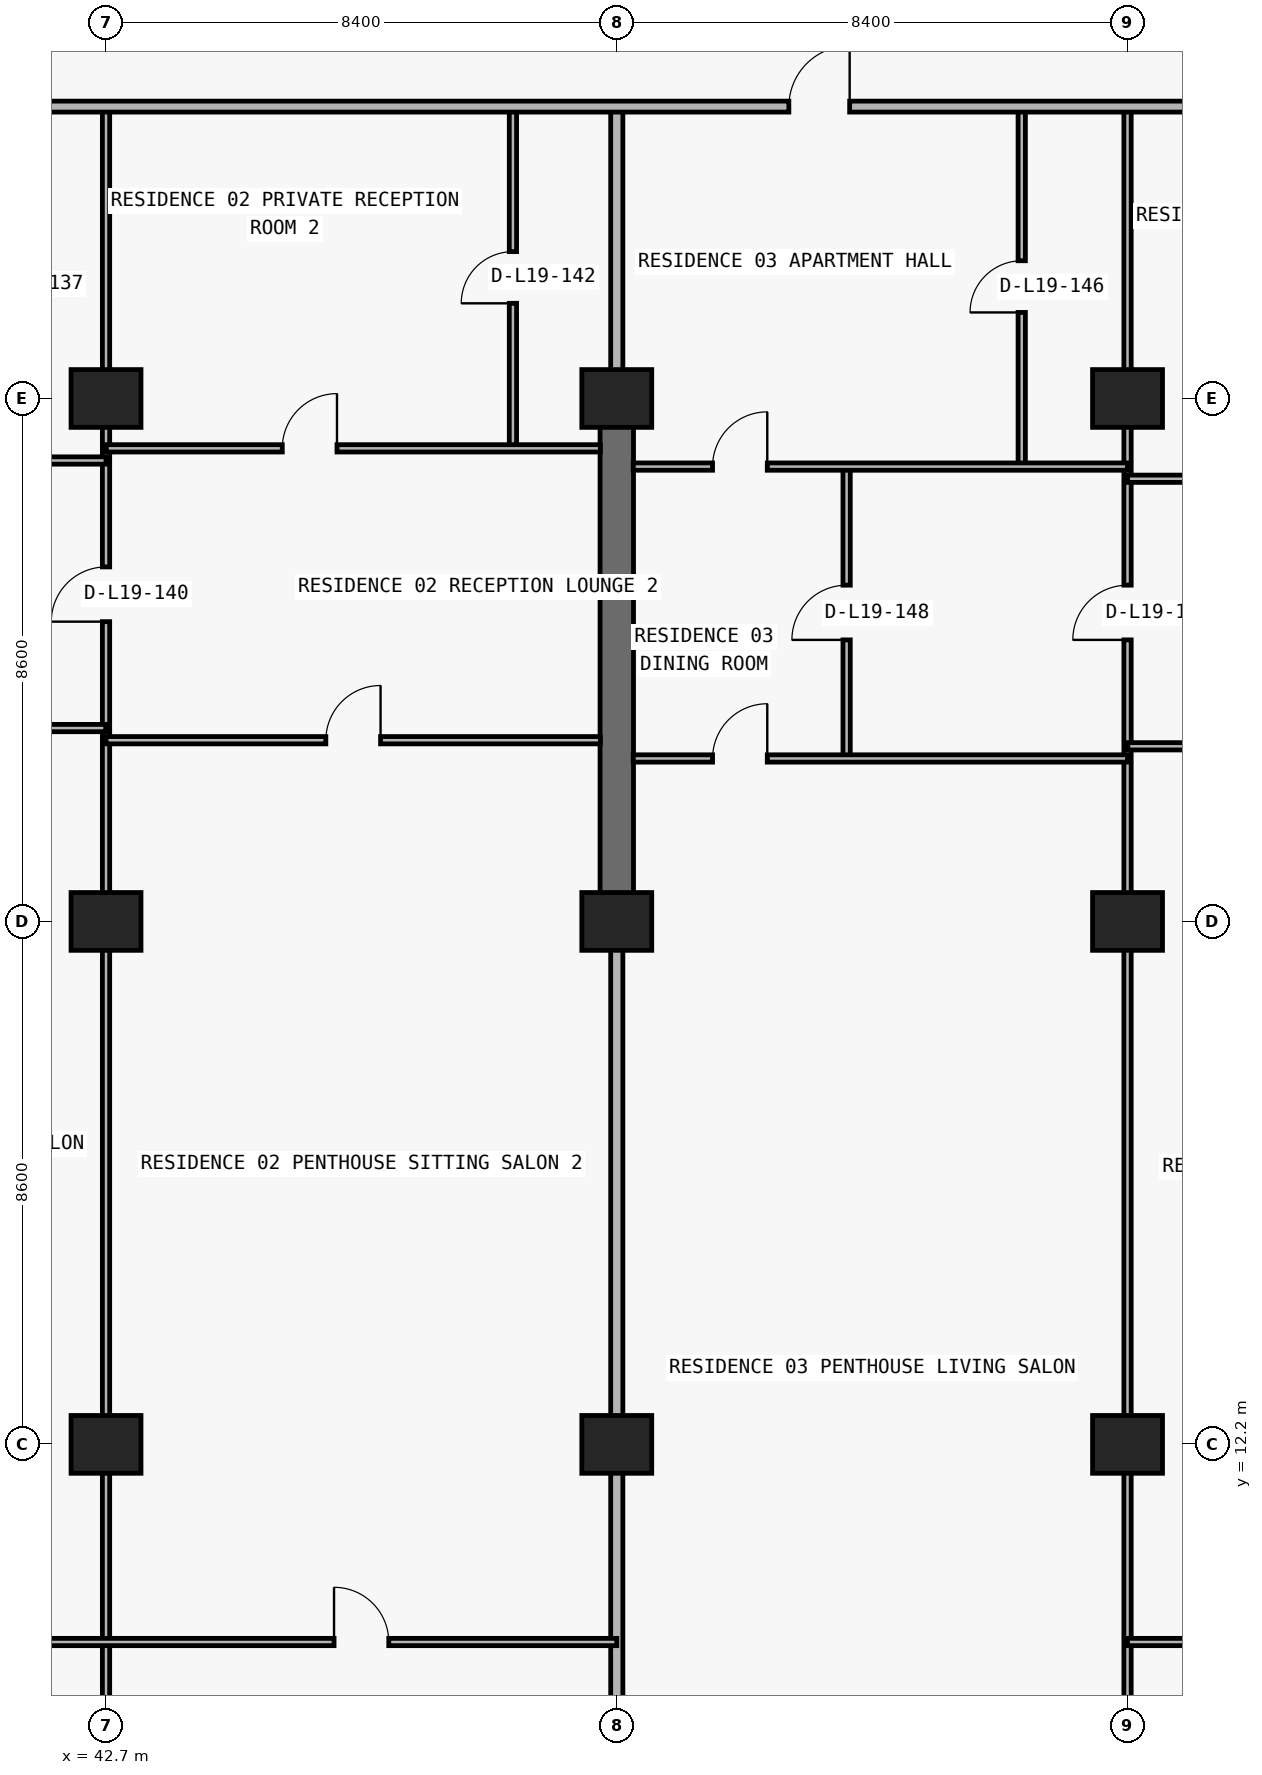
"""IFC4 building model, lengths in metres.
Left out: names, types, materials, properties, quantities, classifications, styles, units other than length and angle.
Written with IfcOpenShell. Run it as: python <this file> out.ifc"""

import sys

from ifc_helpers import new_model, si_unit, direction, frame, frame_2d, origin, origin_2d, place, context, subcontext, project, spatial, rectangle, extrude, element, fill, save


model = new_model("IFC4")
c1 = context("Model", 3, precision=1e-05, world=origin(), true_north=direction((0.0, 1.0)))
c2 = subcontext(c1, "Body", "Model", "MODEL_VIEW")
j1 = project(units=[si_unit("LENGTHUNIT", "METRE"), si_unit("PLANEANGLEUNIT", "RADIAN")], contexts=[c1])
p1 = place(None, origin())
s1 = spatial("IfcSite", under=j1, at=p1, CompositionType="ELEMENT")
p2 = place(p1, origin())
s2 = spatial("IfcBuilding", under=s1, at=p2, CompositionType="ELEMENT")
p3 = place(p2, frame((0.0, 0.0, 72.9)))
s3 = spatial("IfcBuildingStorey", under=s2, at=p3, CompositionType="ELEMENT", Elevation=72.9)
for number, where, z_axis, x_axis in (
    (1, (42.7, 12.2, 0.0), (0.0, 0.0, 1.0), (1.0, 0.0, 0.0)),
    (2, (51.1, 12.2, 0.0), (0.0, 0.0, 1.0), (1.0, 0.0, 0.0)),
    (3, (59.5, 12.2, 0.0), (0.0, 0.0, 1.0), (1.0, 0.0, 0.0)),
    (4, (42.7, 20.8, 0.0), (0.0, 0.0, 1.0), (1.0, 0.0, 0.0)),
    (5, (51.1, 20.8, 0.0), (0.0, 0.0, 1.0), (1.0, 0.0, 0.0)),
    (6, (59.5, 20.8, 0.0), (0.0, 0.0, 1.0), (1.0, 0.0, 0.0)),
    (7, (42.7, 29.4, 0.0), (0.0, 0.0, 1.0), (1.0, 0.0, 0.0)),
    (8, (51.1, 29.4, 0.0), (0.0, 0.0, 1.0), (1.0, 0.0, 0.0)),
    (9, (59.5, 29.4, 0.0), (0.0, 0.0, 1.0), (1.0, 0.0, 0.0)),
):
    element("IfcColumn", number, at=place(p3, frame(where, z_axis=z_axis, x_axis=x_axis)), inside=s3, PredefinedType="COLUMN", context=c2, shape_type="SweptSolid", body=[
        extrude(rectangle(XDim=1.15, YDim=0.95, at=origin_2d()), origin(), (0.0, 0.0, 1.0), 3.05),
    ])
p4 = place(p3, frame((51.1, 20.8, 0.0), z_axis=(0.0, 0.0, 1.0), x_axis=(0.0, 1.0, 0.0)))
e10 = element("IfcWall", 10, at=p4, inside=s3, PredefinedType="SHEAR", context=c2, shape_type="SweptSolid", body=[
    extrude(rectangle(XDim=8.6, YDim=0.55, at=frame_2d((4.3, 0.0))), origin(), (0.0, 0.0, 1.0), 3.05),
])
p5 = place(p3, frame((42.7, 6.24, 0.0), z_axis=(0.0, 0.0, 1.0), x_axis=(0.0, 1.0, 0.0)))
e11 = element("IfcWall", 11, at=p5, inside=s3, PredefinedType="PARTITIONING", context=c2, shape_type="SweptSolid", body=[
    extrude(rectangle(XDim=27.96, YDim=0.12, at=frame_2d((13.98, 0.0))), origin(), (0.0, 0.0, 1.0), 2.11),
])
p6 = place(p5, frame((19.49, 0.0, 0.0)))
e12 = element("IfcOpeningElement", 12, at=p6, cuts=e11, PredefinedType="OPENING", context=c2, shape_type="SweptSolid", body=[
    extrude(rectangle(XDim=0.9, YDim=2.06, at=frame_2d((0.45, 1.03))), frame((0.0, 0.07, 0.0), z_axis=(0.0, -1.0, 0.0), x_axis=(1.0, 0.0, 0.0)), (0.0, 0.0, 1.0), 0.14),
])
p7 = place(p3, frame((49.392, 28.58, 0.0), z_axis=(0.0, 0.0, 1.0), x_axis=(0.0, 1.0, 0.0)))
e13 = element("IfcWall", 13, at=p7, inside=s3, PredefinedType="PARTITIONING", context=c2, shape_type="SweptSolid", body=[
    extrude(rectangle(XDim=5.62, YDim=0.12, at=frame_2d((2.81, 0.0))), origin(), (0.0, 0.0, 1.0), 3.05),
])
p8 = place(p7, frame((2.385, 0.0, 0.0)))
e14 = element("IfcOpeningElement", 14, at=p8, cuts=e13, PredefinedType="OPENING", context=c2, shape_type="SweptSolid", body=[
    extrude(rectangle(XDim=0.85, YDim=2.1, at=frame_2d((0.425, 1.05))), frame((0.0, 0.07, 0.0), z_axis=(0.0, -1.0, 0.0), x_axis=(1.0, 0.0, 0.0)), (0.0, 0.0, 1.0), 0.14),
])
p9 = place(p3, frame((51.1, 6.24, 0.0), z_axis=(0.0, 0.0, 1.0), x_axis=(0.0, 1.0, 0.0)))
e15 = element("IfcWall", 15, at=p9, inside=s3, PredefinedType="PARTITIONING", context=c2, shape_type="SweptSolid", body=[
    extrude(rectangle(XDim=14.555, YDim=0.2, at=frame_2d((7.277, 0.0))), origin(), (0.0, 0.0, 1.0), 2.11),
])
p10 = place(p3, frame((51.1, 29.405, 0.0), z_axis=(0.0, 0.0, 1.0), x_axis=(0.0, 1.0, 0.0)))
e16 = element("IfcWall", 16, at=p10, inside=s3, PredefinedType="PARTITIONING", context=c2, shape_type="SweptSolid", body=[
    extrude(rectangle(XDim=4.795, YDim=0.2, at=frame_2d((2.397, 0.0))), origin(), (0.0, 0.0, 1.0), 2.335),
])
p11 = place(p3, frame((54.88, 23.48, 0.0), z_axis=(0.0, 0.0, 1.0), x_axis=(0.0, 1.0, 0.0)))
e17 = element("IfcWall", 17, at=p11, inside=s3, PredefinedType="PARTITIONING", context=c2, shape_type="SweptSolid", body=[
    extrude(rectangle(XDim=4.8, YDim=0.12, at=frame_2d((2.4, 0.0))), origin(), (0.0, 0.0, 1.0), 3.05),
])
p12 = place(p11, frame((1.95, 0.0, 0.0)))
e18 = element("IfcOpeningElement", 18, at=p12, cuts=e17, PredefinedType="OPENING", context=c2, shape_type="SweptSolid", body=[
    extrude(rectangle(XDim=0.9, YDim=2.15, at=frame_2d((0.45, 1.075))), frame((0.0, 0.07, 0.0), z_axis=(0.0, -1.0, 0.0), x_axis=(1.0, 0.0, 0.0)), (0.0, 0.0, 1.0), 0.14),
])
p13 = place(p3, frame((57.76, 28.28, 0.0), z_axis=(0.0, 0.0, 1.0), x_axis=(0.0, 1.0, 0.0)))
e19 = element("IfcWall", 19, at=p13, inside=s3, PredefinedType="PARTITIONING", context=c2, shape_type="SweptSolid", body=[
    extrude(rectangle(XDim=5.92, YDim=0.12, at=frame_2d((2.96, 0.0))), origin(), (0.0, 0.0, 1.0), 3.05),
])
p14 = place(p13, frame((2.535, 0.0, 0.0)))
e20 = element("IfcOpeningElement", 20, at=p14, cuts=e19, PredefinedType="OPENING", context=c2, shape_type="SweptSolid", body=[
    extrude(rectangle(XDim=0.85, YDim=2.1, at=frame_2d((0.425, 1.05))), frame((0.0, 0.07, 0.0), z_axis=(0.0, -1.0, 0.0), x_axis=(1.0, 0.0, 0.0)), (0.0, 0.0, 1.0), 0.14),
])
p15 = place(p3, frame((59.5, 6.24, 0.0), z_axis=(0.0, 0.0, 1.0), x_axis=(0.0, 1.0, 0.0)))
e21 = element("IfcWall", 21, at=p15, inside=s3, PredefinedType="PARTITIONING", context=c2, shape_type="SweptSolid", body=[
    extrude(rectangle(XDim=27.96, YDim=0.12, at=frame_2d((13.98, 0.0))), origin(), (0.0, 0.0, 1.0), 2.11),
])
p16 = place(p15, frame((19.19, 0.0, 0.0)))
e22 = element("IfcOpeningElement", 22, at=p16, cuts=e21, PredefinedType="OPENING", context=c2, shape_type="SweptSolid", body=[
    extrude(rectangle(XDim=0.9, YDim=2.06, at=frame_2d((0.45, 1.03))), frame((0.0, 0.07, 0.0), z_axis=(0.0, -1.0, 0.0), x_axis=(1.0, 0.0, 0.0)), (0.0, 0.0, 1.0), 0.14),
])
p17 = place(p3, frame((35.1, 8.95, 0.0), z_axis=(0.0, 0.0, 1.0), x_axis=(1.0, 0.0, 0.0)))
e23 = element("IfcWall", 23, at=p17, inside=s3, PredefinedType="PARTITIONING", context=c2, shape_type="SweptSolid", body=[
    extrude(rectangle(XDim=16.0, YDim=0.12, at=frame_2d((8.0, 0.0))), origin(), (0.0, 0.0, 1.0), 3.05),
])
p18 = place(p17, frame((3.35, 0.0, 0.0)))
e24 = element("IfcOpeningElement", 24, at=p18, cuts=e23, PredefinedType="OPENING", context=c2, shape_type="SweptSolid", body=[
    extrude(rectangle(XDim=0.9, YDim=2.15, at=frame_2d((0.45, 1.075))), frame((0.0, 0.07, 0.0), z_axis=(0.0, -1.0, 0.0), x_axis=(1.0, 0.0, 0.0)), (0.0, 0.0, 1.0), 0.14),
])
p19 = place(p17, frame((11.35, 0.0, 0.0)))
e25 = element("IfcOpeningElement", 25, at=p19, cuts=e23, PredefinedType="OPENING", context=c2, shape_type="SweptSolid", body=[
    extrude(rectangle(XDim=0.9, YDim=2.15, at=frame_2d((0.45, 1.075))), frame((0.0, 0.07, 0.0), z_axis=(0.0, -1.0, 0.0), x_axis=(1.0, 0.0, 0.0)), (0.0, 0.0, 1.0), 0.14),
])
p20 = place(p3, frame((59.5, 8.95, 0.0), z_axis=(0.0, 0.0, 1.0), x_axis=(1.0, 0.0, 0.0)))
e26 = element("IfcWall", 26, at=p20, inside=s3, PredefinedType="PARTITIONING", context=c2, shape_type="SweptSolid", body=[
    extrude(rectangle(XDim=8.4, YDim=0.12, at=frame_2d((4.2, 0.0))), origin(), (0.0, 0.0, 1.0), 3.05),
])
p21 = place(p20, frame((3.75, 0.0, 0.0)))
e27 = element("IfcOpeningElement", 27, at=p21, cuts=e26, PredefinedType="OPENING", context=c2, shape_type="SweptSolid", body=[
    extrude(rectangle(XDim=0.9, YDim=2.15, at=frame_2d((0.45, 1.075))), frame((0.0, 0.07, 0.0), z_axis=(0.0, -1.0, 0.0), x_axis=(1.0, 0.0, 0.0)), (0.0, 0.0, 1.0), 0.14),
])
p22 = place(p3, frame((51.37, 23.48, 0.0), z_axis=(0.0, 0.0, 1.0), x_axis=(1.0, 0.0, 0.0)))
e28 = element("IfcWall", 28, at=p22, inside=s3, PredefinedType="PARTITIONING", context=c2, shape_type="SweptSolid", body=[
    extrude(rectangle(XDim=8.13, YDim=0.12, at=frame_2d((4.065, 0.0))), origin(), (0.0, 0.0, 1.0), 3.05),
])
p23 = place(p22, frame((1.305, 0.0, 0.0)))
e29 = element("IfcOpeningElement", 29, at=p23, cuts=e28, PredefinedType="OPENING", context=c2, shape_type="SweptSolid", body=[
    extrude(rectangle(XDim=0.9, YDim=2.15, at=frame_2d((0.45, 1.075))), frame((0.0, 0.07, 0.0), z_axis=(0.0, -1.0, 0.0), x_axis=(1.0, 0.0, 0.0)), (0.0, 0.0, 1.0), 0.14),
])
p24 = place(p3, frame((59.505, 23.68, 0.0), z_axis=(0.0, 0.0, 1.0), x_axis=(1.0, 0.0, 0.0)))
e30 = element("IfcWall", 30, at=p24, inside=s3, PredefinedType="PARTITIONING", context=c2, shape_type="SweptSolid", body=[
    extrude(rectangle(XDim=8.395, YDim=0.12, at=frame_2d((4.198, 0.0))), origin(), (0.0, 0.0, 1.0), 3.05),
])
p25 = place(p24, frame((3.748, 0.0, 0.0)))
e31 = element("IfcOpeningElement", 31, at=p25, cuts=e30, PredefinedType="OPENING", context=c2, shape_type="SweptSolid", body=[
    extrude(rectangle(XDim=0.9, YDim=2.15, at=frame_2d((0.45, 1.075))), frame((0.0, 0.07, 0.0), z_axis=(0.0, -1.0, 0.0), x_axis=(1.0, 0.0, 0.0)), (0.0, 0.0, 1.0), 0.14),
])
p26 = place(p3, frame((42.7, 23.78, 0.0), z_axis=(0.0, 0.0, 1.0), x_axis=(1.0, 0.0, 0.0)))
e32 = element("IfcWall", 32, at=p26, inside=s3, PredefinedType="PARTITIONING", context=c2, shape_type="SweptSolid", body=[
    extrude(rectangle(XDim=8.13, YDim=0.12, at=frame_2d((4.065, 0.0))), origin(), (0.0, 0.0, 1.0), 3.05),
])
p27 = place(p26, frame((3.615, 0.0, 0.0)))
e33 = element("IfcOpeningElement", 33, at=p27, cuts=e32, PredefinedType="OPENING", context=c2, shape_type="SweptSolid", body=[
    extrude(rectangle(XDim=0.9, YDim=2.15, at=frame_2d((0.45, 1.075))), frame((0.0, 0.07, 0.0), z_axis=(0.0, -1.0, 0.0), x_axis=(1.0, 0.0, 0.0)), (0.0, 0.0, 1.0), 0.14),
])
p28 = place(p3, frame((35.105, 23.98, 0.0), z_axis=(0.0, 0.0, 1.0), x_axis=(1.0, 0.0, 0.0)))
e34 = element("IfcWall", 34, at=p28, inside=s3, PredefinedType="PARTITIONING", context=c2, shape_type="SweptSolid", body=[
    extrude(rectangle(XDim=7.59, YDim=0.12, at=frame_2d((3.795, 0.0))), origin(), (0.0, 0.0, 1.0), 3.05),
])
p29 = place(p28, frame((3.345, 0.0, 0.0)))
e35 = element("IfcOpeningElement", 35, at=p29, cuts=e34, PredefinedType="OPENING", context=c2, shape_type="SweptSolid", body=[
    extrude(rectangle(XDim=0.9, YDim=2.15, at=frame_2d((0.45, 1.075))), frame((0.0, 0.07, 0.0), z_axis=(0.0, -1.0, 0.0), x_axis=(1.0, 0.0, 0.0)), (0.0, 0.0, 1.0), 0.14),
])
p30 = place(p3, frame((59.5, 28.08, 0.0), z_axis=(0.0, 0.0, 1.0), x_axis=(1.0, 0.0, 0.0)))
e36 = element("IfcWall", 36, at=p30, inside=s3, PredefinedType="PARTITIONING", context=c2, shape_type="SweptSolid", body=[
    extrude(rectangle(XDim=8.4, YDim=0.12, at=frame_2d((4.2, 0.0))), origin(), (0.0, 0.0, 1.0), 3.05),
])
p31 = place(p30, frame((2.966, 0.0, 0.0)))
e37 = element("IfcOpeningElement", 37, at=p31, cuts=e36, PredefinedType="OPENING", context=c2, shape_type="SweptSolid", body=[
    extrude(rectangle(XDim=0.9, YDim=2.15, at=frame_2d((0.45, 1.075))), frame((0.0, 0.07, 0.0), z_axis=(0.0, -1.0, 0.0), x_axis=(1.0, 0.0, 0.0)), (0.0, 0.0, 1.0), 0.14),
])
p32 = place(p3, frame((51.37, 28.28, 0.0), z_axis=(0.0, 0.0, 1.0), x_axis=(1.0, 0.0, 0.0)))
e38 = element("IfcWall", 38, at=p32, inside=s3, PredefinedType="PARTITIONING", context=c2, shape_type="SweptSolid", body=[
    extrude(rectangle(XDim=8.13, YDim=0.12, at=frame_2d((4.065, 0.0))), origin(), (0.0, 0.0, 1.0), 3.05),
])
p33 = place(p32, frame((1.305, 0.0, 0.0)))
e39 = element("IfcOpeningElement", 39, at=p33, cuts=e38, PredefinedType="OPENING", context=c2, shape_type="SweptSolid", body=[
    extrude(rectangle(XDim=0.9, YDim=2.15, at=frame_2d((0.45, 1.075))), frame((0.0, 0.07, 0.0), z_axis=(0.0, -1.0, 0.0), x_axis=(1.0, 0.0, 0.0)), (0.0, 0.0, 1.0), 0.14),
])
p34 = place(p3, frame((35.1, 28.38, 0.0), z_axis=(0.0, 0.0, 1.0), x_axis=(1.0, 0.0, 0.0)))
e40 = element("IfcWall", 40, at=p34, inside=s3, PredefinedType="PARTITIONING", context=c2, shape_type="SweptSolid", body=[
    extrude(rectangle(XDim=7.6, YDim=0.12, at=frame_2d((3.8, 0.0))), origin(), (0.0, 0.0, 1.0), 3.05),
])
p35 = place(p34, frame((2.482, 0.0, 0.0)))
e41 = element("IfcOpeningElement", 41, at=p35, cuts=e40, PredefinedType="OPENING", context=c2, shape_type="SweptSolid", body=[
    extrude(rectangle(XDim=0.9, YDim=2.15, at=frame_2d((0.45, 1.075))), frame((0.0, 0.07, 0.0), z_axis=(0.0, -1.0, 0.0), x_axis=(1.0, 0.0, 0.0)), (0.0, 0.0, 1.0), 0.14),
])
p36 = place(p3, frame((42.705, 28.58, 0.0), z_axis=(0.0, 0.0, 1.0), x_axis=(1.0, 0.0, 0.0)))
e42 = element("IfcWall", 42, at=p36, inside=s3, PredefinedType="PARTITIONING", context=c2, shape_type="SweptSolid", body=[
    extrude(rectangle(XDim=8.125, YDim=0.12, at=frame_2d((4.062, 0.0))), origin(), (0.0, 0.0, 1.0), 3.05),
])
p37 = place(p36, frame((2.894, 0.0, 0.0)))
e43 = element("IfcOpeningElement", 43, at=p37, cuts=e42, PredefinedType="OPENING", context=c2, shape_type="SweptSolid", body=[
    extrude(rectangle(XDim=0.9, YDim=2.15, at=frame_2d((0.45, 1.075))), frame((0.0, 0.07, 0.0), z_axis=(0.0, -1.0, 0.0), x_axis=(1.0, 0.0, 0.0)), (0.0, 0.0, 1.0), 0.14),
])
p38 = place(p3, frame((5.105, 34.2, 0.0), z_axis=(0.0, 0.0, 1.0), x_axis=(1.0, 0.0, 0.0)))
e44 = element("IfcWall", 44, at=p38, inside=s3, PredefinedType="PARTITIONING", context=c2, shape_type="SweptSolid", body=[
    extrude(rectangle(XDim=67.595, YDim=0.18, at=frame_2d((33.797, 0.0))), origin(), (0.0, 0.0, 1.0), 3.05),
])
p39 = place(p38, frame((7.639, 0.0, 0.0)))
e45 = element("IfcOpeningElement", 45, at=p39, cuts=e44, PredefinedType="OPENING", context=c2, shape_type="SweptSolid", body=[
    extrude(rectangle(XDim=1.0, YDim=2.2, at=frame_2d((0.5, 1.1))), frame((0.0, 0.1, 0.0), z_axis=(0.0, -1.0, 0.0), x_axis=(1.0, 0.0, 0.0)), (0.0, 0.0, 1.0), 0.2),
])
p40 = place(p38, frame((24.423, 0.0, 0.0)))
e46 = element("IfcOpeningElement", 46, at=p40, cuts=e44, PredefinedType="OPENING", context=c2, shape_type="SweptSolid", body=[
    extrude(rectangle(XDim=1.0, YDim=2.2, at=frame_2d((0.5, 1.1))), frame((0.0, 0.1, 0.0), z_axis=(0.0, -1.0, 0.0), x_axis=(1.0, 0.0, 0.0)), (0.0, 0.0, 1.0), 0.2),
])
p41 = place(p38, frame((48.825, 0.0, 0.0)))
e47 = element("IfcOpeningElement", 47, at=p41, cuts=e44, PredefinedType="OPENING", context=c2, shape_type="SweptSolid", body=[
    extrude(rectangle(XDim=1.0, YDim=2.2, at=frame_2d((0.5, 1.1))), frame((0.0, 0.1, 0.0), z_axis=(0.0, -1.0, 0.0), x_axis=(1.0, 0.0, 0.0)), (0.0, 0.0, 1.0), 0.2),
])
p42 = place(p6, origin())
e48 = element("IfcDoor", 48, at=p42, inside=s3, OperationType="SINGLE_SWING_LEFT", PredefinedType="DOOR", context=c2, shape_type="SweptSolid", body=[
    extrude(rectangle(XDim=0.9, YDim=2.06, at=frame_2d((0.45, 1.03))), frame((0.0, 0.025, 0.0), z_axis=(0.0, -1.0, 0.0), x_axis=(1.0, 0.0, 0.0)), (0.0, 0.0, 1.0), 0.05),
])
fill(e12, e48)
p43 = place(p37, origin())
e49 = element("IfcDoor", 49, at=p43, inside=s3, OperationType="SINGLE_SWING_RIGHT", PredefinedType="DOOR", context=c2, shape_type="SweptSolid", body=[
    extrude(rectangle(XDim=0.9, YDim=2.15, at=frame_2d((0.45, 1.075))), frame((0.0, 0.025, 0.0), z_axis=(0.0, -1.0, 0.0), x_axis=(1.0, 0.0, 0.0)), (0.0, 0.0, 1.0), 0.05),
])
fill(e43, e49)
p44 = place(p8, origin())
e50 = element("IfcDoor", 50, at=p44, inside=s3, OperationType="SINGLE_SWING_LEFT", PredefinedType="DOOR", context=c2, shape_type="SweptSolid", body=[
    extrude(rectangle(XDim=0.85, YDim=2.1, at=frame_2d((0.425, 1.05))), frame((0.0, 0.025, 0.0), z_axis=(0.0, -1.0, 0.0), x_axis=(1.0, 0.0, 0.0)), (0.0, 0.0, 1.0), 0.05),
])
fill(e14, e50)
p45 = place(p27, origin())
e51 = element("IfcDoor", 51, at=p45, inside=s3, OperationType="SINGLE_SWING_RIGHT", PredefinedType="DOOR", context=c2, shape_type="SweptSolid", body=[
    extrude(rectangle(XDim=0.9, YDim=2.15, at=frame_2d((0.45, 1.075))), frame((0.0, 0.025, 0.0), z_axis=(0.0, -1.0, 0.0), x_axis=(1.0, 0.0, 0.0)), (0.0, 0.0, 1.0), 0.05),
])
fill(e33, e51)
p46 = place(p19, origin())
e52 = element("IfcDoor", 52, at=p46, inside=s3, OperationType="SINGLE_SWING_LEFT", PredefinedType="DOOR", context=c2, shape_type="SweptSolid", body=[
    extrude(rectangle(XDim=0.9, YDim=2.15, at=frame_2d((0.45, 1.075))), frame((0.0, 0.025, 0.0), z_axis=(0.0, -1.0, 0.0), x_axis=(1.0, 0.0, 0.0)), (0.0, 0.0, 1.0), 0.05),
])
fill(e25, e52)
p47 = place(p41, origin())
e53 = element("IfcDoor", 53, at=p47, inside=s3, OperationType="SINGLE_SWING_RIGHT", PredefinedType="DOOR", context=c2, shape_type="SweptSolid", body=[
    extrude(rectangle(XDim=1.0, YDim=2.2, at=frame_2d((0.5, 1.1))), frame((0.0, 0.025, 0.0), z_axis=(0.0, -1.0, 0.0), x_axis=(1.0, 0.0, 0.0)), (0.0, 0.0, 1.0), 0.05),
])
fill(e47, e53)
p48 = place(p14, origin())
e54 = element("IfcDoor", 54, at=p48, inside=s3, OperationType="SINGLE_SWING_LEFT", PredefinedType="DOOR", context=c2, shape_type="SweptSolid", body=[
    extrude(rectangle(XDim=0.85, YDim=2.1, at=frame_2d((0.425, 1.05))), frame((0.0, 0.025, 0.0), z_axis=(0.0, -1.0, 0.0), x_axis=(1.0, 0.0, 0.0)), (0.0, 0.0, 1.0), 0.05),
])
fill(e20, e54)
p49 = place(p33, origin())
e55 = element("IfcDoor", 55, at=p49, inside=s3, OperationType="SINGLE_SWING_RIGHT", PredefinedType="DOOR", context=c2, shape_type="SweptSolid", body=[
    extrude(rectangle(XDim=0.9, YDim=2.15, at=frame_2d((0.45, 1.075))), frame((0.0, 0.025, 0.0), z_axis=(0.0, -1.0, 0.0), x_axis=(1.0, 0.0, 0.0)), (0.0, 0.0, 1.0), 0.05),
])
fill(e39, e55)
p50 = place(p12, origin())
e56 = element("IfcDoor", 56, at=p50, inside=s3, OperationType="SINGLE_SWING_LEFT", PredefinedType="DOOR", context=c2, shape_type="SweptSolid", body=[
    extrude(rectangle(XDim=0.9, YDim=2.15, at=frame_2d((0.45, 1.075))), frame((0.0, 0.025, 0.0), z_axis=(0.0, -1.0, 0.0), x_axis=(1.0, 0.0, 0.0)), (0.0, 0.0, 1.0), 0.05),
])
fill(e18, e56)
p51 = place(p23, origin())
e57 = element("IfcDoor", 57, at=p51, inside=s3, OperationType="SINGLE_SWING_RIGHT", PredefinedType="DOOR", context=c2, shape_type="SweptSolid", body=[
    extrude(rectangle(XDim=0.9, YDim=2.15, at=frame_2d((0.45, 1.075))), frame((0.0, 0.025, 0.0), z_axis=(0.0, -1.0, 0.0), x_axis=(1.0, 0.0, 0.0)), (0.0, 0.0, 1.0), 0.05),
])
fill(e29, e57)
p52 = place(p16, origin())
e58 = element("IfcDoor", 58, at=p52, inside=s3, OperationType="SINGLE_SWING_LEFT", PredefinedType="DOOR", context=c2, shape_type="SweptSolid", body=[
    extrude(rectangle(XDim=0.9, YDim=2.06, at=frame_2d((0.45, 1.03))), frame((0.0, 0.025, 0.0), z_axis=(0.0, -1.0, 0.0), x_axis=(1.0, 0.0, 0.0)), (0.0, 0.0, 1.0), 0.05),
])
fill(e22, e58)
save(model, sys.argv[1])
